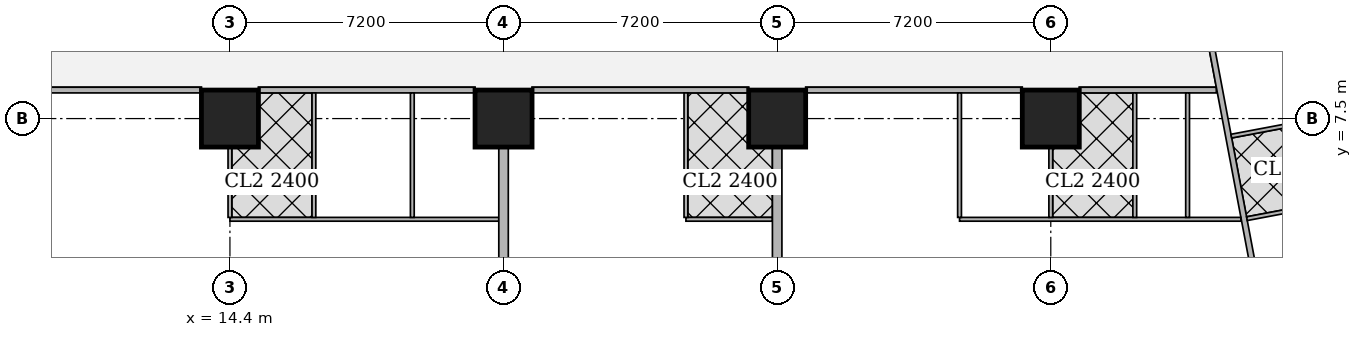
"""IFC4 building model, lengths in metres.
Left out: names, types, materials, properties, quantities, classifications, styles, units other than length and angle.
Written with IfcOpenShell. Run it as: python <this file> out.ifc"""

import sys

from ifc_helpers import new_model, si_unit, direction, frame, frame_2d, origin, origin_2d, place, context, subcontext, project, spatial, rectangle, extrude, element, fill, save


model = new_model("IFC4")
c1 = context("Model", 3, precision=1e-05, world=origin(), true_north=direction((0.0, 1.0)))
c2 = subcontext(c1, "Body", "Model", "MODEL_VIEW")
j1 = project(units=[si_unit("LENGTHUNIT", "METRE"), si_unit("PLANEANGLEUNIT", "RADIAN")], contexts=[c1])
p1 = place(None, origin())
s1 = spatial("IfcSite", under=j1, at=p1, CompositionType="ELEMENT")
p2 = place(p1, origin())
s2 = spatial("IfcBuilding", under=s1, at=p2, CompositionType="ELEMENT")
p3 = place(p2, frame((0.0, 0.0, 169.55)))
s3 = spatial("IfcBuildingStorey", under=s2, at=p3, CompositionType="ELEMENT", Elevation=169.55)
for number, where, z_axis, x_axis in (
    (1, (14.4, 7.5, 0.0), (0.0, 0.0, 1.0), (1.0, 0.0, 0.0)),
    (2, (21.6, 7.5, 0.0), (0.0, 0.0, 1.0), (1.0, 0.0, 0.0)),
    (3, (28.8, 7.5, 0.0), (0.0, 0.0, 1.0), (1.0, 0.0, 0.0)),
    (4, (36.0, 7.5, 0.0), (0.0, 0.0, 1.0), (1.0, 0.0, 0.0)),
):
    element("IfcColumn", number, at=place(p3, frame(where, z_axis=z_axis, x_axis=x_axis)), inside=s3, PredefinedType="COLUMN", context=c2, shape_type="SweptSolid", body=[
        extrude(rectangle(XDim=1.5, YDim=1.5, at=origin_2d()), origin(), (0.0, 0.0, 1.0), 3.75),
    ])
p4 = place(p3, frame((40.356, 8.25, 0.0), z_axis=(0.0, 0.0, 1.0), x_axis=(-1.0, 0.0, 0.0)))
e5 = element("IfcWall", 5, at=p4, inside=s3, PredefinedType="SOLIDWALL", context=c2, shape_type="SweptSolid", body=[
    extrude(rectangle(XDim=3.605, YDim=0.15, at=frame_2d((1.802, 0.0))), origin(), (0.0, 0.0, 1.0), 3.5),
])
p5 = place(p3, frame((35.249, 8.25, 0.0), z_axis=(0.0, 0.0, 1.0), x_axis=(-1.0, 0.0, 0.0)))
e6 = element("IfcWall", 6, at=p5, inside=s3, PredefinedType="SOLIDWALL", context=c2, shape_type="SweptSolid", body=[
    extrude(rectangle(XDim=5.698, YDim=0.15, at=frame_2d((2.849, 0.0))), origin(), (0.0, 0.0, 1.0), 3.5),
])
p6 = place(p5, frame((3.549, 0.0, 0.0)))
e7 = element("IfcOpeningElement", 7, at=p6, cuts=e6, PredefinedType="OPENING", context=c2, shape_type="SweptSolid", body=[
    extrude(rectangle(XDim=1.0, YDim=2.1, at=frame_2d((0.5, 1.05))), frame((0.0, 0.085, 0.0), z_axis=(0.0, -1.0, 0.0), x_axis=(1.0, 0.0, 0.0)), (0.0, 0.0, 1.0), 0.17),
])
p7 = place(p3, frame((28.049, 8.25, 0.0), z_axis=(0.0, 0.0, 1.0), x_axis=(-1.0, 0.0, 0.0)))
e8 = element("IfcWall", 8, at=p7, inside=s3, PredefinedType="SOLIDWALL", context=c2, shape_type="SweptSolid", body=[
    extrude(rectangle(XDim=5.698, YDim=0.15, at=frame_2d((2.849, 0.0))), origin(), (0.0, 0.0, 1.0), 3.5),
])
p8 = place(p7, frame((3.549, 0.0, 0.0)))
e9 = element("IfcOpeningElement", 9, at=p8, cuts=e8, PredefinedType="OPENING", context=c2, shape_type="SweptSolid", body=[
    extrude(rectangle(XDim=1.0, YDim=2.1, at=frame_2d((0.5, 1.05))), frame((0.0, 0.085, 0.0), z_axis=(0.0, -1.0, 0.0), x_axis=(1.0, 0.0, 0.0)), (0.0, 0.0, 1.0), 0.17),
])
p9 = place(p3, frame((20.849, 8.25, 0.0), z_axis=(0.0, 0.0, 1.0), x_axis=(-1.0, 0.0, 0.0)))
e10 = element("IfcWall", 10, at=p9, inside=s3, PredefinedType="SOLIDWALL", context=c2, shape_type="SweptSolid", body=[
    extrude(rectangle(XDim=5.698, YDim=0.15, at=frame_2d((2.849, 0.0))), origin(), (0.0, 0.0, 1.0), 3.5),
])
p10 = place(p3, frame((13.649, 8.25, 0.0), z_axis=(0.0, 0.0, 1.0), x_axis=(-1.0, 0.0, 0.0)))
e11 = element("IfcWall", 11, at=p10, inside=s3, PredefinedType="SOLIDWALL", context=c2, shape_type="SweptSolid", body=[
    extrude(rectangle(XDim=5.549, YDim=0.15, at=frame_2d((2.774, 0.0))), origin(), (0.0, 0.0, 1.0), 3.5),
])
p11 = place(p10, frame((1.824, 0.0, 0.0)))
e12 = element("IfcOpeningElement", 12, at=p11, cuts=e11, PredefinedType="OPENING", context=c2, shape_type="SweptSolid", body=[
    extrude(rectangle(XDim=1.0, YDim=2.1, at=frame_2d((0.5, 1.05))), frame((0.0, 0.085, 0.0), z_axis=(0.0, -1.0, 0.0), x_axis=(1.0, 0.0, 0.0)), (0.0, 0.0, 1.0), 0.17),
])
p12 = place(p3, frame((33.877, 43.029, 0.0), z_axis=(0.0, 0.0, 1.0), x_axis=(0.185596841028, -0.98262597798, 0.0)))
e13 = element("IfcWall", 13, at=p12, inside=s3, PredefinedType="SOLIDWALL", context=c2, shape_type="SweptSolid", body=[
    extrude(rectangle(XDim=41.66, YDim=0.15, at=frame_2d((20.83, 0.0))), origin(), (0.0, 0.0, 1.0), 2.5),
])
p13 = place(p12, frame((8.63, 0.0, 0.0)))
e14 = element("IfcOpeningElement", 14, at=p13, cuts=e13, PredefinedType="OPENING", context=c2, shape_type="SweptSolid", body=[
    extrude(rectangle(XDim=1.0, YDim=2.1, at=frame_2d((0.5, 1.05))), frame((0.0, 0.085, 0.0), z_axis=(0.0, -1.0, 0.0), x_axis=(1.0, 0.0, 0.0)), (0.0, 0.0, 1.0), 0.17),
])
p14 = place(p12, frame((13.841, 0.0, 0.0)))
e15 = element("IfcOpeningElement", 15, at=p14, cuts=e13, PredefinedType="OPENING", context=c2, shape_type="SweptSolid", body=[
    extrude(rectangle(XDim=1.0, YDim=2.1, at=frame_2d((0.5, 1.05))), frame((0.0, 0.085, 0.0), z_axis=(0.0, -1.0, 0.0), x_axis=(1.0, 0.0, 0.0)), (0.0, 0.0, 1.0), 0.17),
])
p15 = place(p12, frame((21.474, 0.0, 0.0)))
e16 = element("IfcOpeningElement", 16, at=p15, cuts=e13, PredefinedType="OPENING", context=c2, shape_type="SweptSolid", body=[
    extrude(rectangle(XDim=1.0, YDim=2.1, at=frame_2d((0.5, 1.05))), frame((0.0, 0.085, 0.0), z_axis=(0.0, -1.0, 0.0), x_axis=(1.0, 0.0, 0.0)), (0.0, 0.0, 1.0), 0.17),
])
p16 = place(p12, frame((30.4, 0.0, 0.0)))
e17 = element("IfcOpeningElement", 17, at=p16, cuts=e13, PredefinedType="OPENING", context=c2, shape_type="SweptSolid", body=[
    extrude(rectangle(XDim=1.0, YDim=2.1, at=frame_2d((0.5, 1.05))), frame((0.0, 0.085, 0.0), z_axis=(0.0, -1.0, 0.0), x_axis=(1.0, 0.0, 0.0)), (0.0, 0.0, 1.0), 0.17),
])
p17 = place(p12, frame((32.288, 0.0, 0.0)))
e18 = element("IfcOpeningElement", 18, at=p17, cuts=e13, PredefinedType="OPENING", context=c2, shape_type="SweptSolid", body=[
    extrude(rectangle(XDim=1.0, YDim=2.1, at=frame_2d((0.5, 1.05))), frame((0.0, 0.085, 0.0), z_axis=(0.0, -1.0, 0.0), x_axis=(1.0, 0.0, 0.0)), (0.0, 0.0, 1.0), 0.17),
])
p18 = place(p3, frame((21.475, 4.85, 0.0), z_axis=(0.0, 0.0, 1.0), x_axis=(-1.0, 0.0, 0.0)))
e19 = element("IfcWall", 19, at=p18, inside=s3, PredefinedType="PARTITIONING", context=c2, shape_type="SweptSolid", body=[
    extrude(rectangle(XDim=7.075, YDim=0.1, at=frame_2d((3.538, 0.0))), origin(), (0.0, 0.0, 1.0), 3.5),
])
p19 = place(p18, frame((5.52, 0.0, 0.0)))
e20 = element("IfcOpeningElement", 20, at=p19, cuts=e19, PredefinedType="OPENING", context=c2, shape_type="SweptSolid", body=[
    extrude(rectangle(XDim=0.9, YDim=2.1, at=frame_2d((0.45, 1.05))), frame((0.0, 0.06, 0.0), z_axis=(0.0, -1.0, 0.0), x_axis=(1.0, 0.0, 0.0)), (0.0, 0.0, 1.0), 0.12),
])
p20 = place(p18, frame((0.625, 0.0, 0.0)))
e21 = element("IfcOpeningElement", 21, at=p20, cuts=e19, PredefinedType="OPENING", context=c2, shape_type="SweptSolid", body=[
    extrude(rectangle(XDim=0.9, YDim=2.1, at=frame_2d((0.45, 1.05))), frame((0.0, 0.06, 0.0), z_axis=(0.0, -1.0, 0.0), x_axis=(1.0, 0.0, 0.0)), (0.0, 0.0, 1.0), 0.12),
])
p21 = place(p18, frame((3.121, 0.0, 0.0)))
e22 = element("IfcOpeningElement", 22, at=p21, cuts=e19, PredefinedType="OPENING", context=c2, shape_type="SweptSolid", body=[
    extrude(rectangle(XDim=0.9, YDim=2.1, at=frame_2d((0.45, 1.05))), frame((0.0, 0.06, 0.0), z_axis=(0.0, -1.0, 0.0), x_axis=(1.0, 0.0, 0.0)), (0.0, 0.0, 1.0), 0.12),
])
p22 = place(p3, frame((14.4, 4.9, 0.0), z_axis=(0.0, 0.0, 1.0), x_axis=(0.0, 1.0, 0.0)))
e23 = element("IfcWall", 23, at=p22, inside=s3, PredefinedType="PARTITIONING", context=c2, shape_type="SweptSolid", body=[
    extrude(rectangle(XDim=1.849, YDim=0.1, at=frame_2d((0.925, 0.0))), origin(), (0.0, 0.0, 1.0), 3.5),
])
for number, where, z_axis, x_axis in (
    (24, (19.199, 4.9, 0.0), (0.0, 0.0, 1.0), (0.0, 1.0, 0.0)),
    (25, (16.61, 4.9, 0.0), (0.0, 0.0, 1.0), (0.0, 1.0, 0.0)),
):
    element("IfcWall", number, at=place(p3, frame(where, z_axis=z_axis, x_axis=x_axis)), inside=s3, PredefinedType="PARTITIONING", context=c2, shape_type="SweptSolid", body=[
        extrude(rectangle(XDim=3.275, YDim=0.1, at=frame_2d((1.638, 0.0))), origin(), (0.0, 0.0, 1.0), 3.5),
    ])
p23 = place(p3, frame((28.675, 4.85, 0.0), z_axis=(0.0, 0.0, 1.0), x_axis=(-1.0, 0.0, 0.0)))
e26 = element("IfcWall", 26, at=p23, inside=s3, PredefinedType="PARTITIONING", context=c2, shape_type="SweptSolid", body=[
    extrude(rectangle(XDim=2.276, YDim=0.1, at=frame_2d((1.138, 0.0))), origin(), (0.0, 0.0, 1.0), 3.5),
])
p24 = place(p23, frame((0.626, 0.0, 0.0)))
e27 = element("IfcOpeningElement", 27, at=p24, cuts=e26, PredefinedType="OPENING", context=c2, shape_type="SweptSolid", body=[
    extrude(rectangle(XDim=0.9, YDim=2.1, at=frame_2d((0.45, 1.05))), frame((0.0, 0.06, 0.0), z_axis=(0.0, -1.0, 0.0), x_axis=(1.0, 0.0, 0.0)), (0.0, 0.0, 1.0), 0.12),
])
p25 = place(p3, frame((26.399, 4.9, 0.0), z_axis=(0.0, 0.0, 1.0), x_axis=(0.0, 1.0, 0.0)))
e28 = element("IfcWall", 28, at=p25, inside=s3, PredefinedType="PARTITIONING", context=c2, shape_type="SweptSolid", body=[
    extrude(rectangle(XDim=3.275, YDim=0.1, at=frame_2d((1.638, 0.0))), origin(), (0.0, 0.0, 1.0), 3.5),
])
p26 = place(p3, frame((21.6, 3.65, 0.0), z_axis=(0.0, 0.0, 1.0), x_axis=(0.0, 1.0, 0.0)))
e29 = element("IfcWall", 29, at=p26, inside=s3, PredefinedType="SOLIDWALL", context=c2, shape_type="SweptSolid", body=[
    extrude(rectangle(XDim=3.099, YDim=0.25, at=frame_2d((1.55, 0.0))), origin(), (0.0, 0.0, 1.0), 3.5),
])
p27 = place(p3, frame((41.002, 4.85, 0.0), z_axis=(0.0, 0.0, 1.0), x_axis=(-1.0, 0.0, 0.0)))
e30 = element("IfcWall", 30, at=p27, inside=s3, PredefinedType="PARTITIONING", context=c2, shape_type="SweptSolid", body=[
    extrude(rectangle(XDim=7.403, YDim=0.1, at=frame_2d((3.701, 0.0))), origin(), (0.0, 0.0, 1.0), 3.5),
])
p28 = place(p27, frame((5.753, 0.0, 0.0)))
e31 = element("IfcOpeningElement", 31, at=p28, cuts=e30, PredefinedType="OPENING", context=c2, shape_type="SweptSolid", body=[
    extrude(rectangle(XDim=0.9, YDim=2.1, at=frame_2d((0.45, 1.05))), frame((0.0, 0.06, 0.0), z_axis=(0.0, -1.0, 0.0), x_axis=(1.0, 0.0, 0.0)), (0.0, 0.0, 1.0), 0.12),
])
p29 = place(p27, frame((3.447, 0.0, 0.0)))
e32 = element("IfcOpeningElement", 32, at=p29, cuts=e30, PredefinedType="OPENING", context=c2, shape_type="SweptSolid", body=[
    extrude(rectangle(XDim=0.9, YDim=2.1, at=frame_2d((0.45, 1.05))), frame((0.0, 0.06, 0.0), z_axis=(0.0, -1.0, 0.0), x_axis=(1.0, 0.0, 0.0)), (0.0, 0.0, 1.0), 0.12),
])
p30 = place(p27, frame((0.15, 0.0, 0.0)))
e33 = element("IfcOpeningElement", 33, at=p30, cuts=e30, PredefinedType="OPENING", context=c2, shape_type="SweptSolid", body=[
    extrude(rectangle(XDim=0.9, YDim=2.1, at=frame_2d((0.45, 1.05))), frame((0.0, 0.06, 0.0), z_axis=(0.0, -1.0, 0.0), x_axis=(1.0, 0.0, 0.0)), (0.0, 0.0, 1.0), 0.12),
])
p31 = place(p27, frame((1.647, 0.0, 0.0)))
e34 = element("IfcOpeningElement", 34, at=p31, cuts=e30, PredefinedType="OPENING", context=c2, shape_type="SweptSolid", body=[
    extrude(rectangle(XDim=0.9, YDim=2.1, at=frame_2d((0.45, 1.05))), frame((0.0, 0.06, 0.0), z_axis=(0.0, -1.0, 0.0), x_axis=(1.0, 0.0, 0.0)), (0.0, 0.0, 1.0), 0.12),
])
p32 = place(p3, frame((33.599, 4.9, 0.0), z_axis=(0.0, 0.0, 1.0), x_axis=(0.0, 1.0, 0.0)))
e35 = element("IfcWall", 35, at=p32, inside=s3, PredefinedType="PARTITIONING", context=c2, shape_type="SweptSolid", body=[
    extrude(rectangle(XDim=3.275, YDim=0.1, at=frame_2d((1.638, 0.0))), origin(), (0.0, 0.0, 1.0), 3.5),
])
p33 = place(p3, frame((36.0, 4.9, 0.0), z_axis=(0.0, 0.0, 1.0), x_axis=(0.0, 1.0, 0.0)))
e36 = element("IfcWall", 36, at=p33, inside=s3, PredefinedType="PARTITIONING", context=c2, shape_type="SweptSolid", body=[
    extrude(rectangle(XDim=1.849, YDim=0.1, at=frame_2d((0.925, 0.0))), origin(), (0.0, 0.0, 1.0), 3.5),
])
for number, where, z_axis, x_axis in (
    (37, (39.6, 4.9, 0.0), (0.0, 0.0, 1.0), (0.0, 1.0, 0.0)),
    (38, (38.21, 4.9, 0.0), (0.0, 0.0, 1.0), (0.0, 1.0, 0.0)),
):
    element("IfcWall", number, at=place(p3, frame(where, z_axis=z_axis, x_axis=x_axis)), inside=s3, PredefinedType="PARTITIONING", context=c2, shape_type="SweptSolid", body=[
        extrude(rectangle(XDim=3.275, YDim=0.1, at=frame_2d((1.638, 0.0))), origin(), (0.0, 0.0, 1.0), 3.5),
    ])
p34 = place(p3, frame((28.8, 3.65, 0.0), z_axis=(0.0, 0.0, 1.0), x_axis=(0.0, 1.0, 0.0)))
e39 = element("IfcWall", 39, at=p34, inside=s3, PredefinedType="SOLIDWALL", context=c2, shape_type="SweptSolid", body=[
    extrude(rectangle(XDim=3.099, YDim=0.25, at=frame_2d((1.55, 0.0))), origin(), (0.0, 0.0, 1.0), 3.5),
])
p35 = place(p3, frame((42.44, 7.357, 0.0), z_axis=(0.0, 0.0, 1.0), x_axis=(-0.982643094077, -0.185506198448, 0.0)))
e40 = element("IfcWall", 40, at=p35, inside=s3, PredefinedType="PARTITIONING", context=c2, shape_type="SweptSolid", body=[
    extrude(rectangle(XDim=1.719, YDim=0.1, at=frame_2d((0.859, 0.0))), origin(), (0.0, 0.0, 1.0), 3.5),
])
p36 = place(p3, frame((44.677, 3.896, 0.0), z_axis=(0.0, 0.0, 1.0), x_axis=(-0.982610347627, -0.185679575441, 0.0)))
e41 = element("IfcWall", 41, at=p36, inside=s3, PredefinedType="PARTITIONING", context=c2, shape_type="SweptSolid", body=[
    extrude(rectangle(XDim=3.274, YDim=0.1, at=frame_2d((1.637, 0.0))), origin(), (0.0, 0.0, 1.0), 3.5),
])
p37 = place(p3, frame((44.379, 5.474, 0.0), z_axis=(0.0, 0.0, 1.0), x_axis=(-0.982607026909, -0.185697147715, 0.0)))
e42 = element("IfcWall", 42, at=p37, inside=s3, PredefinedType="PARTITIONING", context=c2, shape_type="SweptSolid", body=[
    extrude(rectangle(XDim=3.275, YDim=0.1, at=frame_2d((1.637, 0.0))), origin(), (0.0, 0.0, 1.0), 3.5),
])
p38 = place(p19, origin())
e43 = element("IfcDoor", 43, at=p38, inside=s3, OperationType="SINGLE_SWING_LEFT", PredefinedType="DOOR", context=c2, shape_type="SweptSolid", body=[
    extrude(rectangle(XDim=0.9, YDim=2.1, at=frame_2d((0.45, 1.05))), frame((0.0, 0.025, 0.0), z_axis=(0.0, -1.0, 0.0), x_axis=(1.0, 0.0, 0.0)), (0.0, 0.0, 1.0), 0.05),
])
fill(e20, e43)
p39 = place(p20, origin())
e44 = element("IfcDoor", 44, at=p39, inside=s3, OperationType="SINGLE_SWING_RIGHT", PredefinedType="DOOR", context=c2, shape_type="SweptSolid", body=[
    extrude(rectangle(XDim=0.9, YDim=2.1, at=frame_2d((0.45, 1.05))), frame((0.0, 0.025, 0.0), z_axis=(0.0, -1.0, 0.0), x_axis=(1.0, 0.0, 0.0)), (0.0, 0.0, 1.0), 0.05),
])
fill(e21, e44)
p40 = place(p21, origin())
e45 = element("IfcDoor", 45, at=p40, inside=s3, OperationType="SINGLE_SWING_LEFT", PredefinedType="DOOR", context=c2, shape_type="SweptSolid", body=[
    extrude(rectangle(XDim=0.9, YDim=2.1, at=frame_2d((0.45, 1.05))), frame((0.0, 0.025, 0.0), z_axis=(0.0, -1.0, 0.0), x_axis=(1.0, 0.0, 0.0)), (0.0, 0.0, 1.0), 0.05),
])
fill(e22, e45)
p41 = place(p11, origin())
e46 = element("IfcDoor", 46, at=p41, inside=s3, OperationType="SINGLE_SWING_RIGHT", PredefinedType="DOOR", context=c2, shape_type="SweptSolid", body=[
    extrude(rectangle(XDim=1.0, YDim=2.1, at=frame_2d((0.5, 1.05))), frame((0.0, 0.025, 0.0), z_axis=(0.0, -1.0, 0.0), x_axis=(1.0, 0.0, 0.0)), (0.0, 0.0, 1.0), 0.05),
])
fill(e12, e46)
p42 = place(p24, origin())
e47 = element("IfcDoor", 47, at=p42, inside=s3, OperationType="SINGLE_SWING_RIGHT", PredefinedType="DOOR", context=c2, shape_type="SweptSolid", body=[
    extrude(rectangle(XDim=0.9, YDim=2.1, at=frame_2d((0.45, 1.05))), frame((0.0, 0.025, 0.0), z_axis=(0.0, -1.0, 0.0), x_axis=(1.0, 0.0, 0.0)), (0.0, 0.0, 1.0), 0.05),
])
fill(e27, e47)
p43 = place(p8, origin())
e48 = element("IfcDoor", 48, at=p43, inside=s3, OperationType="SINGLE_SWING_RIGHT", PredefinedType="DOOR", context=c2, shape_type="SweptSolid", body=[
    extrude(rectangle(XDim=1.0, YDim=2.1, at=frame_2d((0.5, 1.05))), frame((0.0, 0.025, 0.0), z_axis=(0.0, -1.0, 0.0), x_axis=(1.0, 0.0, 0.0)), (0.0, 0.0, 1.0), 0.05),
])
fill(e9, e48)
p44 = place(p28, origin())
e49 = element("IfcDoor", 49, at=p44, inside=s3, OperationType="SINGLE_SWING_LEFT", PredefinedType="DOOR", context=c2, shape_type="SweptSolid", body=[
    extrude(rectangle(XDim=0.9, YDim=2.1, at=frame_2d((0.45, 1.05))), frame((0.0, 0.025, 0.0), z_axis=(0.0, -1.0, 0.0), x_axis=(1.0, 0.0, 0.0)), (0.0, 0.0, 1.0), 0.05),
])
fill(e31, e49)
p45 = place(p29, origin())
e50 = element("IfcDoor", 50, at=p45, inside=s3, OperationType="SINGLE_SWING_RIGHT", PredefinedType="DOOR", context=c2, shape_type="SweptSolid", body=[
    extrude(rectangle(XDim=0.9, YDim=2.1, at=frame_2d((0.45, 1.05))), frame((0.0, 0.025, 0.0), z_axis=(0.0, -1.0, 0.0), x_axis=(1.0, 0.0, 0.0)), (0.0, 0.0, 1.0), 0.05),
])
fill(e32, e50)
p46 = place(p30, origin())
e51 = element("IfcDoor", 51, at=p46, inside=s3, OperationType="SINGLE_SWING_RIGHT", PredefinedType="DOOR", context=c2, shape_type="SweptSolid", body=[
    extrude(rectangle(XDim=0.9, YDim=2.1, at=frame_2d((0.45, 1.05))), frame((0.0, 0.025, 0.0), z_axis=(0.0, -1.0, 0.0), x_axis=(1.0, 0.0, 0.0)), (0.0, 0.0, 1.0), 0.05),
])
fill(e33, e51)
p47 = place(p31, origin())
e52 = element("IfcDoor", 52, at=p47, inside=s3, OperationType="SINGLE_SWING_LEFT", PredefinedType="DOOR", context=c2, shape_type="SweptSolid", body=[
    extrude(rectangle(XDim=0.9, YDim=2.1, at=frame_2d((0.45, 1.05))), frame((0.0, 0.025, 0.0), z_axis=(0.0, -1.0, 0.0), x_axis=(1.0, 0.0, 0.0)), (0.0, 0.0, 1.0), 0.05),
])
fill(e34, e52)
p48 = place(p6, origin())
e53 = element("IfcDoor", 53, at=p48, inside=s3, OperationType="SINGLE_SWING_RIGHT", PredefinedType="DOOR", context=c2, shape_type="SweptSolid", body=[
    extrude(rectangle(XDim=1.0, YDim=2.1, at=frame_2d((0.5, 1.05))), frame((0.0, 0.025, 0.0), z_axis=(0.0, -1.0, 0.0), x_axis=(1.0, 0.0, 0.0)), (0.0, 0.0, 1.0), 0.05),
])
fill(e7, e53)
save(model, sys.argv[1])
